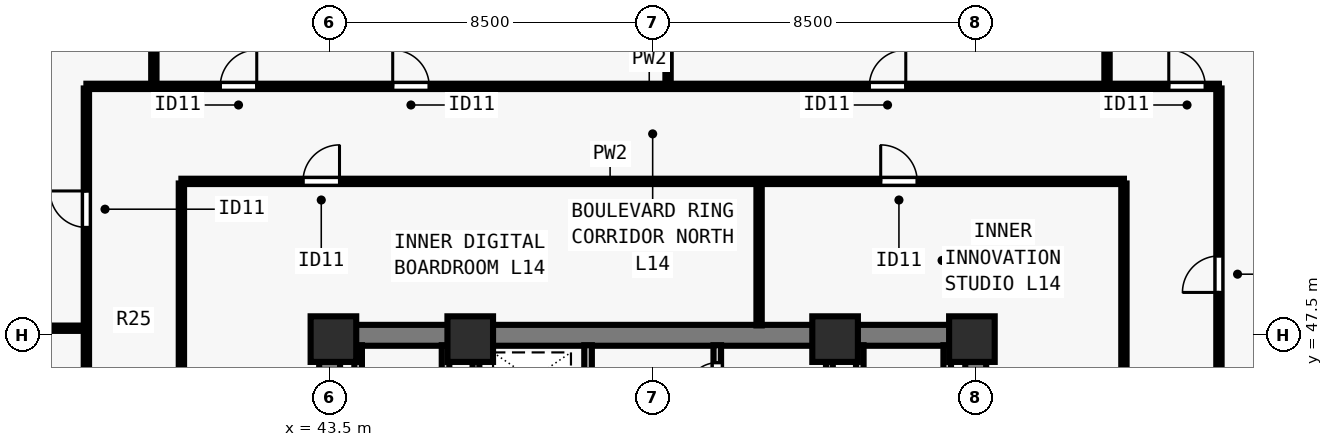
"""IFC4 building model, lengths in metres.
Left out: names, types, materials, properties, quantities, classifications, styles, units other than length and angle.
Written with IfcOpenShell. Run it as: python <this file> out.ifc"""

import sys

from ifc_helpers import new_model, si_unit, direction, frame, frame_2d, origin, origin_2d, place, context, subcontext, project, spatial, rectangle, extrude, element, fill, save


model = new_model("IFC4")
c1 = context("Model", 3, precision=1e-05, world=origin(), true_north=direction((0.0, 1.0)))
c2 = subcontext(c1, "Body", "Model", "MODEL_VIEW")
j1 = project(units=[si_unit("LENGTHUNIT", "METRE"), si_unit("PLANEANGLEUNIT", "RADIAN")], contexts=[c1])
p1 = place(None, origin())
s1 = spatial("IfcSite", under=j1, at=p1, CompositionType="ELEMENT")
p2 = place(p1, origin())
s2 = spatial("IfcBuilding", under=s1, at=p2, CompositionType="ELEMENT")
p3 = place(p2, frame((0.0, 0.0, 55.0)))
s3 = spatial("IfcBuildingStorey", under=s2, at=p3, CompositionType="ELEMENT", Elevation=55.0)
for number, where, z_axis, x_axis in (
    (1, (43.6, 47.4, 0.0), (0.0, 0.0, 1.0), (1.0, 0.0, 0.0)),
    (2, (47.2, 47.4, 0.0), (0.0, 0.0, 1.0), (1.0, 0.0, 0.0)),
    (3, (56.8, 47.4, 0.0), (0.0, 0.0, 1.0), (1.0, 0.0, 0.0)),
    (4, (60.4, 47.4, 0.0), (0.0, 0.0, 1.0), (1.0, 0.0, 0.0)),
):
    element("IfcColumn", number, at=place(p3, frame(where, z_axis=z_axis, x_axis=x_axis)), inside=s3, PredefinedType="COLUMN", context=c2, shape_type="SweptSolid", body=[
        extrude(rectangle(XDim=1.2, YDim=1.2, at=origin_2d()), origin(), (0.0, 0.0, 1.0), 3.5),
    ])
p4 = place(p3, frame((43.225, 47.5, 0.0), z_axis=(0.0, 0.0, 1.0), x_axis=(1.0, 0.0, 0.0)))
e5 = element("IfcWall", 5, at=p4, inside=s3, PredefinedType="SHEAR", context=c2, shape_type="SweptSolid", body=[
    extrude(rectangle(XDim=17.55, YDim=0.55, at=frame_2d((8.775, 0.0))), origin(), (0.0, 0.0, 1.0), 3.28),
])
for number, where, z_axis, x_axis in (
    (6, (43.5, 40.8, 0.0), (0.0, 0.0, 1.0), (0.0, 1.0, 0.0)),
    (7, (60.5, 40.8, 0.0), (0.0, 0.0, 1.0), (0.0, 1.0, 0.0)),
):
    element("IfcWall", number, at=place(p3, frame(where, z_axis=z_axis, x_axis=x_axis)), inside=s3, PredefinedType="SHEAR", context=c2, shape_type="SweptSolid", body=[
        extrude(rectangle(XDim=6.435, YDim=0.55, at=frame_2d((3.218, 0.0))), origin(), (0.0, 0.0, 1.0), 3.28),
    ])
p5 = place(p3, frame((50.3, 40.585, 0.0), z_axis=(0.0, 0.0, 1.0), x_axis=(0.0, 1.0, 0.0)))
e8 = element("IfcWall", 8, at=p5, inside=s3, PredefinedType="SOLIDWALL", context=c2, shape_type="SweptSolid", body=[
    extrude(rectangle(XDim=6.655, YDim=0.2, at=frame_2d((3.328, 0.0))), origin(), (0.0, 0.0, 1.0), 3.28),
])
p6 = place(p5, frame((5.065, 0.0, 0.0)))
e9 = element("IfcOpeningElement", 9, at=p6, cuts=e8, PredefinedType="OPENING", context=c2, shape_type="SweptSolid", body=[
    extrude(rectangle(XDim=0.8, YDim=2.08, at=frame_2d((0.4, 1.04))), frame((0.0, 0.11, 0.0), z_axis=(0.0, -1.0, 0.0), x_axis=(1.0, 0.0, 0.0)), (0.0, 0.0, 1.0), 0.22),
])
p7 = place(p3, frame((53.7, 40.585, 0.0), z_axis=(0.0, 0.0, 1.0), x_axis=(0.0, 1.0, 0.0)))
e10 = element("IfcWall", 10, at=p7, inside=s3, PredefinedType="SOLIDWALL", context=c2, shape_type="SweptSolid", body=[
    extrude(rectangle(XDim=6.655, YDim=0.2, at=frame_2d((3.328, 0.0))), origin(), (0.0, 0.0, 1.0), 3.28),
])
p8 = place(p7, frame((0.195, 0.0, 0.0)))
e11 = element("IfcOpeningElement", 11, at=p8, cuts=e10, PredefinedType="OPENING", context=c2, shape_type="SweptSolid", body=[
    extrude(rectangle(XDim=0.8, YDim=2.08, at=frame_2d((0.4, 1.04))), frame((0.0, 0.11, 0.0), z_axis=(0.0, -1.0, 0.0), x_axis=(1.0, 0.0, 0.0)), (0.0, 0.0, 1.0), 0.22),
])
p9 = place(p7, frame((3.735, 0.0, 0.0)))
e12 = element("IfcOpeningElement", 12, at=p9, cuts=e10, PredefinedType="OPENING", context=c2, shape_type="SweptSolid", body=[
    extrude(rectangle(XDim=0.9, YDim=2.12, at=frame_2d((0.45, 1.06))), frame((0.0, 0.11, 0.0), z_axis=(0.0, -1.0, 0.0), x_axis=(1.0, 0.0, 0.0)), (0.0, 0.0, 1.0), 0.22),
])
p10 = place(p7, frame((5.395, 0.0, 0.0)))
e13 = element("IfcOpeningElement", 13, at=p10, cuts=e10, PredefinedType="OPENING", context=c2, shape_type="SweptSolid", body=[
    extrude(rectangle(XDim=0.8, YDim=2.1, at=frame_2d((0.4, 1.05))), frame((0.0, 0.11, 0.0), z_axis=(0.0, -1.0, 0.0), x_axis=(1.0, 0.0, 0.0)), (0.0, 0.0, 1.0), 0.22),
])
for number, where, z_axis, x_axis in (
    (14, (46.55, 43.735, 0.0), (0.0, 0.0, 1.0), (0.0, 1.0, 0.0)),
    (15, (44.25, 43.735, 0.0), (0.0, 0.0, 1.0), (0.0, 1.0, 0.0)),
    (16, (57.45, 43.735, 0.0), (0.0, 0.0, 1.0), (0.0, 1.0, 0.0)),
    (17, (59.75, 43.735, 0.0), (0.0, 0.0, 1.0), (0.0, 1.0, 0.0)),
):
    element("IfcWall", number, at=place(p3, frame(where, z_axis=z_axis, x_axis=x_axis)), inside=s3, PredefinedType="SOLIDWALL", context=c2, shape_type="SweptSolid", body=[
        extrude(rectangle(XDim=3.505, YDim=0.2, at=frame_2d((1.752, 0.0))), origin(), (0.0, 0.0, 1.0), 3.28),
    ])
for number, where, z_axis, x_axis in (
    (18, (47.35, 43.735, 0.0), (0.0, 0.0, 1.0), (0.0, 1.0, 0.0)),
    (19, (56.65, 43.735, 0.0), (0.0, 0.0, 1.0), (0.0, 1.0, 0.0)),
):
    element("IfcWall", number, at=place(p3, frame(where, z_axis=z_axis, x_axis=x_axis)), inside=s3, PredefinedType="SOLIDWALL", context=c2, shape_type="SweptSolid", body=[
        extrude(rectangle(XDim=3.505, YDim=0.18, at=frame_2d((1.752, 0.0))), origin(), (0.0, 0.0, 1.0), 3.28),
    ])
p11 = place(p3, frame((37.1, 54.05, 0.0), z_axis=(0.0, 0.0, 1.0), x_axis=(1.0, 0.0, 0.0)))
e20 = element("IfcWall", 20, at=p11, inside=s3, PredefinedType="PARTITIONING", context=c2, shape_type="SweptSolid", body=[
    extrude(rectangle(XDim=29.8, YDim=0.14, at=frame_2d((14.9, 0.0))), origin(), (0.0, 0.0, 1.0), 3.28),
])
p12 = place(p11, frame((3.522, 0.0, 0.0)))
e21 = element("IfcOpeningElement", 21, at=p12, cuts=e20, PredefinedType="OPENING", context=c2, shape_type="SweptSolid", body=[
    extrude(rectangle(XDim=0.96, YDim=2.12, at=frame_2d((0.48, 1.06))), frame((0.0, 0.08, 0.0), z_axis=(0.0, -1.0, 0.0), x_axis=(1.0, 0.0, 0.0)), (0.0, 0.0, 1.0), 0.16),
])
p13 = place(p11, frame((8.06, 0.0, 0.0)))
e22 = element("IfcOpeningElement", 22, at=p13, cuts=e20, PredefinedType="OPENING", context=c2, shape_type="SweptSolid", body=[
    extrude(rectangle(XDim=0.96, YDim=2.12, at=frame_2d((0.48, 1.06))), frame((0.0, 0.08, 0.0), z_axis=(0.0, -1.0, 0.0), x_axis=(1.0, 0.0, 0.0)), (0.0, 0.0, 1.0), 0.16),
])
p14 = place(p11, frame((20.6, 0.0, 0.0)))
e23 = element("IfcOpeningElement", 23, at=p14, cuts=e20, PredefinedType="OPENING", context=c2, shape_type="SweptSolid", body=[
    extrude(rectangle(XDim=0.96, YDim=2.12, at=frame_2d((0.48, 1.06))), frame((0.0, 0.08, 0.0), z_axis=(0.0, -1.0, 0.0), x_axis=(1.0, 0.0, 0.0)), (0.0, 0.0, 1.0), 0.16),
])
p15 = place(p11, frame((28.48, 0.0, 0.0)))
e24 = element("IfcOpeningElement", 24, at=p15, cuts=e20, PredefinedType="OPENING", context=c2, shape_type="SweptSolid", body=[
    extrude(rectangle(XDim=0.96, YDim=2.12, at=frame_2d((0.48, 1.06))), frame((0.0, 0.08, 0.0), z_axis=(0.0, -1.0, 0.0), x_axis=(1.0, 0.0, 0.0)), (0.0, 0.0, 1.0), 0.16),
])
p16 = place(p3, frame((37.1, 24.005, 0.0), z_axis=(0.0, 0.0, 1.0), x_axis=(0.0, 1.0, 0.0)))
e25 = element("IfcWall", 25, at=p16, inside=s3, PredefinedType="PARTITIONING", context=c2, shape_type="SweptSolid", body=[
    extrude(rectangle(XDim=29.99, YDim=0.14, at=frame_2d((14.995, 0.0))), origin(), (0.0, 0.0, 1.0), 3.28),
])
p17 = place(p16, frame((2.76, 0.0, 0.0)))
e26 = element("IfcOpeningElement", 26, at=p17, cuts=e25, PredefinedType="OPENING", context=c2, shape_type="SweptSolid", body=[
    extrude(rectangle(XDim=0.96, YDim=2.12, at=frame_2d((0.48, 1.06))), frame((0.0, 0.08, 0.0), z_axis=(0.0, -1.0, 0.0), x_axis=(1.0, 0.0, 0.0)), (0.0, 0.0, 1.0), 0.16),
])
p18 = place(p16, frame((8.598, 0.0, 0.0)))
e27 = element("IfcOpeningElement", 27, at=p18, cuts=e25, PredefinedType="OPENING", context=c2, shape_type="SweptSolid", body=[
    extrude(rectangle(XDim=0.96, YDim=2.12, at=frame_2d((0.48, 1.06))), frame((0.0, 0.08, 0.0), z_axis=(0.0, -1.0, 0.0), x_axis=(1.0, 0.0, 0.0)), (0.0, 0.0, 1.0), 0.16),
])
p19 = place(p16, frame((14.578, 0.0, 0.0)))
e28 = element("IfcOpeningElement", 28, at=p19, cuts=e25, PredefinedType="OPENING", context=c2, shape_type="SweptSolid", body=[
    extrude(rectangle(XDim=0.96, YDim=2.12, at=frame_2d((0.48, 1.06))), frame((0.0, 0.08, 0.0), z_axis=(0.0, -1.0, 0.0), x_axis=(1.0, 0.0, 0.0)), (0.0, 0.0, 1.0), 0.16),
])
p20 = place(p16, frame((20.558, 0.0, 0.0)))
e29 = element("IfcOpeningElement", 29, at=p20, cuts=e25, PredefinedType="OPENING", context=c2, shape_type="SweptSolid", body=[
    extrude(rectangle(XDim=0.96, YDim=2.12, at=frame_2d((0.48, 1.06))), frame((0.0, 0.08, 0.0), z_axis=(0.0, -1.0, 0.0), x_axis=(1.0, 0.0, 0.0)), (0.0, 0.0, 1.0), 0.16),
])
p21 = place(p16, frame((26.333, 0.0, 0.0)))
e30 = element("IfcOpeningElement", 30, at=p21, cuts=e25, PredefinedType="OPENING", context=c2, shape_type="SweptSolid", body=[
    extrude(rectangle(XDim=0.96, YDim=2.12, at=frame_2d((0.48, 1.06))), frame((0.0, 0.08, 0.0), z_axis=(0.0, -1.0, 0.0), x_axis=(1.0, 0.0, 0.0)), (0.0, 0.0, 1.0), 0.16),
])
p22 = place(p3, frame((66.9, 24.005, 0.0), z_axis=(0.0, 0.0, 1.0), x_axis=(0.0, 1.0, 0.0)))
e31 = element("IfcWall", 31, at=p22, inside=s3, PredefinedType="PARTITIONING", context=c2, shape_type="SweptSolid", body=[
    extrude(rectangle(XDim=29.99, YDim=0.14, at=frame_2d((14.995, 0.0))), origin(), (0.0, 0.0, 1.0), 3.28),
])
p23 = place(p22, frame((4.344, 0.0, 0.0)))
e32 = element("IfcOpeningElement", 32, at=p23, cuts=e31, PredefinedType="OPENING", context=c2, shape_type="SweptSolid", body=[
    extrude(rectangle(XDim=0.96, YDim=2.12, at=frame_2d((0.48, 1.06))), frame((0.0, 0.08, 0.0), z_axis=(0.0, -1.0, 0.0), x_axis=(1.0, 0.0, 0.0)), (0.0, 0.0, 1.0), 0.16),
])
p24 = place(p22, frame((14.452, 0.0, 0.0)))
e33 = element("IfcOpeningElement", 33, at=p24, cuts=e31, PredefinedType="OPENING", context=c2, shape_type="SweptSolid", body=[
    extrude(rectangle(XDim=0.96, YDim=2.12, at=frame_2d((0.48, 1.06))), frame((0.0, 0.08, 0.0), z_axis=(0.0, -1.0, 0.0), x_axis=(1.0, 0.0, 0.0)), (0.0, 0.0, 1.0), 0.16),
])
p25 = place(p22, frame((24.623, 0.0, 0.0)))
e34 = element("IfcOpeningElement", 34, at=p25, cuts=e31, PredefinedType="OPENING", context=c2, shape_type="SweptSolid", body=[
    extrude(rectangle(XDim=0.96, YDim=2.12, at=frame_2d((0.48, 1.06))), frame((0.0, 0.08, 0.0), z_axis=(0.0, -1.0, 0.0), x_axis=(1.0, 0.0, 0.0)), (0.0, 0.0, 1.0), 0.16),
])
p26 = place(p3, frame((39.6, 51.55, 0.0), z_axis=(0.0, 0.0, 1.0), x_axis=(1.0, 0.0, 0.0)))
e35 = element("IfcWall", 35, at=p26, inside=s3, PredefinedType="PARTITIONING", context=c2, shape_type="SweptSolid", body=[
    extrude(rectangle(XDim=24.8, YDim=0.14, at=frame_2d((12.4, 0.0))), origin(), (0.0, 0.0, 1.0), 3.28),
])
p27 = place(p26, frame((3.2, 0.0, 0.0)))
e36 = element("IfcOpeningElement", 36, at=p27, cuts=e35, PredefinedType="OPENING", context=c2, shape_type="SweptSolid", body=[
    extrude(rectangle(XDim=0.96, YDim=2.12, at=frame_2d((0.48, 1.06))), frame((0.0, 0.08, 0.0), z_axis=(0.0, -1.0, 0.0), x_axis=(1.0, 0.0, 0.0)), (0.0, 0.0, 1.0), 0.16),
])
p28 = place(p26, frame((18.4, 0.0, 0.0)))
e37 = element("IfcOpeningElement", 37, at=p28, cuts=e35, PredefinedType="OPENING", context=c2, shape_type="SweptSolid", body=[
    extrude(rectangle(XDim=0.96, YDim=2.12, at=frame_2d((0.48, 1.06))), frame((0.0, 0.08, 0.0), z_axis=(0.0, -1.0, 0.0), x_axis=(1.0, 0.0, 0.0)), (0.0, 0.0, 1.0), 0.16),
])
p29 = place(p3, frame((39.6, 40.8, 0.0), z_axis=(0.0, 0.0, 1.0), x_axis=(0.0, 1.0, 0.0)))
e38 = element("IfcWall", 38, at=p29, inside=s3, PredefinedType="PARTITIONING", context=c2, shape_type="SweptSolid", body=[
    extrude(rectangle(XDim=10.695, YDim=0.14, at=frame_2d((5.348, 0.0))), origin(), (0.0, 0.0, 1.0), 3.28),
])
p30 = place(p29, frame((2.5, 0.0, 0.0)))
e39 = element("IfcOpeningElement", 39, at=p30, cuts=e38, PredefinedType="OPENING", context=c2, shape_type="SweptSolid", body=[
    extrude(rectangle(XDim=0.88, YDim=2.1, at=frame_2d((0.44, 1.05))), frame((0.0, 0.08, 0.0), z_axis=(0.0, -1.0, 0.0), x_axis=(1.0, 0.0, 0.0)), (0.0, 0.0, 1.0), 0.16),
])
p31 = place(p3, frame((64.4, 40.8, 0.0), z_axis=(0.0, 0.0, 1.0), x_axis=(0.0, 1.0, 0.0)))
e40 = element("IfcWall", 40, at=p31, inside=s3, PredefinedType="PARTITIONING", context=c2, shape_type="SweptSolid", body=[
    extrude(rectangle(XDim=10.695, YDim=0.14, at=frame_2d((5.348, 0.0))), origin(), (0.0, 0.0, 1.0), 3.28),
])
p32 = place(p31, frame((2.5, 0.0, 0.0)))
e41 = element("IfcOpeningElement", 41, at=p32, cuts=e40, PredefinedType="OPENING", context=c2, shape_type="SweptSolid", body=[
    extrude(rectangle(XDim=0.88, YDim=2.1, at=frame_2d((0.44, 1.05))), frame((0.0, 0.08, 0.0), z_axis=(0.0, -1.0, 0.0), x_axis=(1.0, 0.0, 0.0)), (0.0, 0.0, 1.0), 0.16),
])
p33 = place(p3, frame((54.8, 47.76, 0.0), z_axis=(0.0, 0.0, 1.0), x_axis=(0.0, 1.0, 0.0)))
e42 = element("IfcWall", 42, at=p33, inside=s3, PredefinedType="PARTITIONING", context=c2, shape_type="SweptSolid", body=[
    extrude(rectangle(XDim=3.735, YDim=0.14, at=frame_2d((1.868, 0.0))), origin(), (0.0, 0.0, 1.0), 3.28),
])
p34 = place(p3, frame((38.875, 54.15, 0.0), z_axis=(0.0, 0.0, 1.0), x_axis=(0.0, 1.0, 0.0)))
e43 = element("IfcWall", 43, at=p34, inside=s3, PredefinedType="PARTITIONING", context=c2, shape_type="SweptSolid", body=[
    extrude(rectangle(XDim=9.93, YDim=0.14, at=frame_2d((4.965, 0.0))), origin(), (0.0, 0.0, 1.0), 3.28),
])
p35 = place(p3, frame((52.405, 54.15, 0.0), z_axis=(0.0, 0.0, 1.0), x_axis=(0.0, 1.0, 0.0)))
e44 = element("IfcWall", 44, at=p35, inside=s3, PredefinedType="PARTITIONING", context=c2, shape_type="SweptSolid", body=[
    extrude(rectangle(XDim=9.93, YDim=0.14, at=frame_2d((4.965, 0.0))), origin(), (0.0, 0.0, 1.0), 2.849),
])
p36 = place(p3, frame((63.955, 54.15, 0.0), z_axis=(0.0, 0.0, 1.0), x_axis=(0.0, 1.0, 0.0)))
e45 = element("IfcWall", 45, at=p36, inside=s3, PredefinedType="PARTITIONING", context=c2, shape_type="SweptSolid", body=[
    extrude(rectangle(XDim=9.93, YDim=0.14, at=frame_2d((4.965, 0.0))), origin(), (0.0, 0.0, 1.0), 3.28),
])
p37 = place(p3, frame((26.92, 47.687, 0.0), z_axis=(0.0, 0.0, 1.0), x_axis=(1.0, 0.0, 0.0)))
e46 = element("IfcWall", 46, at=p37, inside=s3, PredefinedType="PARTITIONING", context=c2, shape_type="SweptSolid", body=[
    extrude(rectangle(XDim=10.08, YDim=0.14, at=frame_2d((5.04, 0.0))), origin(), (0.0, 0.0, 1.0), 3.28),
])
p38 = place(p10, origin())
e47 = element("IfcDoor", 47, at=p38, inside=s3, OperationType="SINGLE_SWING_LEFT", PredefinedType="DOOR", context=c2, shape_type="SweptSolid", body=[
    extrude(rectangle(XDim=0.8, YDim=2.1, at=frame_2d((0.4, 1.05))), frame((0.0, 0.025, 0.0), z_axis=(0.0, -1.0, 0.0), x_axis=(1.0, 0.0, 0.0)), (0.0, 0.0, 1.0), 0.05),
])
fill(e13, e47)
p39 = place(p27, origin())
e48 = element("IfcDoor", 48, at=p39, inside=s3, OperationType="SINGLE_SWING_RIGHT", PredefinedType="DOOR", context=c2, shape_type="SweptSolid", body=[
    extrude(rectangle(XDim=0.96, YDim=2.12, at=frame_2d((0.48, 1.06))), frame((0.0, 0.025, 0.0), z_axis=(0.0, -1.0, 0.0), x_axis=(1.0, 0.0, 0.0)), (0.0, 0.0, 1.0), 0.05),
])
fill(e36, e48)
p40 = place(p28, origin())
e49 = element("IfcDoor", 49, at=p40, inside=s3, OperationType="SINGLE_SWING_LEFT", PredefinedType="DOOR", context=c2, shape_type="SweptSolid", body=[
    extrude(rectangle(XDim=0.96, YDim=2.12, at=frame_2d((0.48, 1.06))), frame((0.0, 0.025, 0.0), z_axis=(0.0, -1.0, 0.0), x_axis=(1.0, 0.0, 0.0)), (0.0, 0.0, 1.0), 0.05),
])
fill(e37, e49)
p41 = place(p12, origin())
e50 = element("IfcDoor", 50, at=p41, inside=s3, OperationType="SINGLE_SWING_RIGHT", PredefinedType="DOOR", context=c2, shape_type="SweptSolid", body=[
    extrude(rectangle(XDim=0.96, YDim=2.12, at=frame_2d((0.48, 1.06))), frame((0.0, 0.025, 0.0), z_axis=(0.0, -1.0, 0.0), x_axis=(1.0, 0.0, 0.0)), (0.0, 0.0, 1.0), 0.05),
])
fill(e21, e50)
p42 = place(p13, origin())
e51 = element("IfcDoor", 51, at=p42, inside=s3, OperationType="SINGLE_SWING_LEFT", PredefinedType="DOOR", context=c2, shape_type="SweptSolid", body=[
    extrude(rectangle(XDim=0.96, YDim=2.12, at=frame_2d((0.48, 1.06))), frame((0.0, 0.025, 0.0), z_axis=(0.0, -1.0, 0.0), x_axis=(1.0, 0.0, 0.0)), (0.0, 0.0, 1.0), 0.05),
])
fill(e22, e51)
p43 = place(p14, origin())
e52 = element("IfcDoor", 52, at=p43, inside=s3, OperationType="SINGLE_SWING_RIGHT", PredefinedType="DOOR", context=c2, shape_type="SweptSolid", body=[
    extrude(rectangle(XDim=0.96, YDim=2.12, at=frame_2d((0.48, 1.06))), frame((0.0, 0.025, 0.0), z_axis=(0.0, -1.0, 0.0), x_axis=(1.0, 0.0, 0.0)), (0.0, 0.0, 1.0), 0.05),
])
fill(e23, e52)
p44 = place(p15, origin())
e53 = element("IfcDoor", 53, at=p44, inside=s3, OperationType="SINGLE_SWING_LEFT", PredefinedType="DOOR", context=c2, shape_type="SweptSolid", body=[
    extrude(rectangle(XDim=0.96, YDim=2.12, at=frame_2d((0.48, 1.06))), frame((0.0, 0.025, 0.0), z_axis=(0.0, -1.0, 0.0), x_axis=(1.0, 0.0, 0.0)), (0.0, 0.0, 1.0), 0.05),
])
fill(e24, e53)
p45 = place(p21, origin())
e54 = element("IfcDoor", 54, at=p45, inside=s3, OperationType="SINGLE_SWING_RIGHT", PredefinedType="DOOR", context=c2, shape_type="SweptSolid", body=[
    extrude(rectangle(XDim=0.96, YDim=2.12, at=frame_2d((0.48, 1.06))), frame((0.0, 0.025, 0.0), z_axis=(0.0, -1.0, 0.0), x_axis=(1.0, 0.0, 0.0)), (0.0, 0.0, 1.0), 0.05),
])
fill(e30, e54)
p46 = place(p25, origin())
e55 = element("IfcDoor", 55, at=p46, inside=s3, OperationType="SINGLE_SWING_LEFT", PredefinedType="DOOR", context=c2, shape_type="SweptSolid", body=[
    extrude(rectangle(XDim=0.96, YDim=2.12, at=frame_2d((0.48, 1.06))), frame((0.0, 0.025, 0.0), z_axis=(0.0, -1.0, 0.0), x_axis=(1.0, 0.0, 0.0)), (0.0, 0.0, 1.0), 0.05),
])
fill(e34, e55)
save(model, sys.argv[1])
